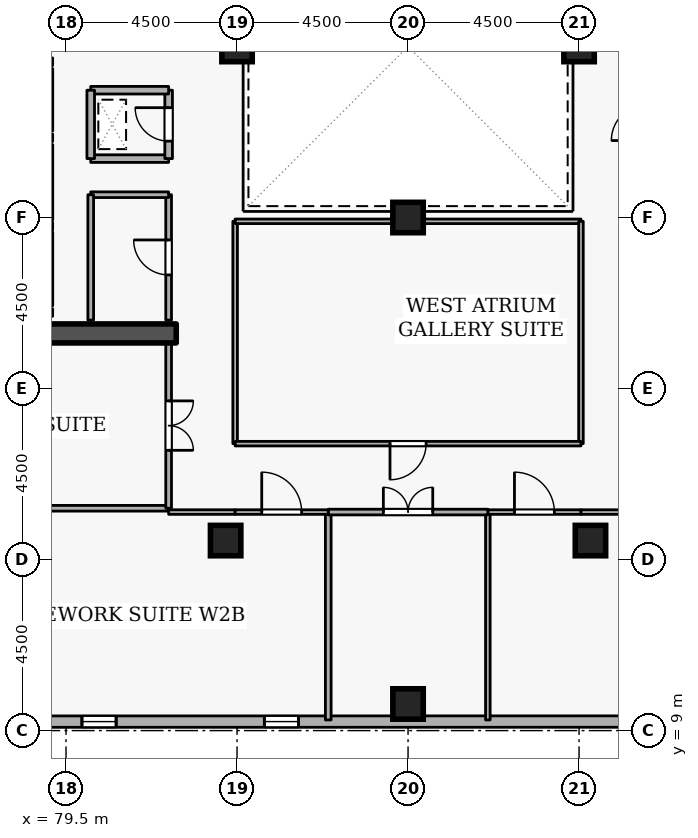
"""IFC4 building model, lengths in metres.
Left out: names, types, materials, properties, quantities, classifications, styles, units other than length and angle.
Written with IfcOpenShell. Run it as: python <this file> out.ifc"""

import sys

from ifc_helpers import new_model, si_unit, direction, frame, frame_2d, origin, origin_2d, place, context, subcontext, project, spatial, rectangle, extrude, element, fill, save


model = new_model("IFC4")
c1 = context("Model", 3, precision=1e-05, world=origin(), true_north=direction((0.0, 1.0)))
c2 = subcontext(c1, "Body", "Model", "MODEL_VIEW")
j1 = project(units=[si_unit("LENGTHUNIT", "METRE"), si_unit("PLANEANGLEUNIT", "RADIAN")], contexts=[c1])
p1 = place(None, origin())
s1 = spatial("IfcSite", under=j1, at=p1, CompositionType="ELEMENT")
p2 = place(p1, origin())
s2 = spatial("IfcBuilding", under=s1, at=p2, CompositionType="ELEMENT")
p3 = place(p2, frame((0.0, 0.0, 261.9)))
s3 = spatial("IfcBuildingStorey", under=s2, at=p3, CompositionType="ELEMENT", Elevation=261.9)
p4 = place(p3, frame((76.6, 19.45, 0.0), z_axis=(0.0, 0.0, 1.0), x_axis=(1.0, 0.0, 0.0)))
e1 = element("IfcWall", 1, at=p4, inside=s3, PredefinedType="SHEAR", context=c2, shape_type="SweptSolid", body=[
    extrude(rectangle(XDim=5.8, YDim=0.5, at=frame_2d((2.9, 0.0))), origin(), (0.0, 0.0, 1.0), 3.6),
])
for number, where, z_axis, x_axis in (
    (2, (88.5, 9.7, 0.0), (0.0, 0.0, 1.0), (1.0, 0.0, 0.0)),
    (3, (93.3, 14.0, 0.0), (0.0, 0.0, 1.0), (1.0, 0.0, 0.0)),
    (4, (83.7, 14.0, 0.0), (0.0, 0.0, 1.0), (1.0, 0.0, 0.0)),
    (5, (93.0, 27.0, 0.0), (0.0, 0.0, 1.0), (1.0, 0.0, 0.0)),
    (6, (84.0, 27.0, 0.0), (0.0, 0.0, 1.0), (1.0, 0.0, 0.0)),
    (7, (88.5, 22.5, 0.0), (0.0, 0.0, 1.0), (1.0, 0.0, 0.0)),
):
    element("IfcColumn", number, at=place(p3, frame(where, z_axis=z_axis, x_axis=x_axis)), inside=s3, PredefinedType="COLUMN", context=c2, shape_type="SweptSolid", body=[
        extrude(rectangle(XDim=0.8, YDim=0.8, at=origin_2d()), origin(), (0.0, 0.0, 1.0), 3.6),
    ])
p5 = place(p3, frame((73.319, 9.235, 0.0), z_axis=(0.0, 0.0, 1.0), x_axis=(0.999999994606, 0.000103863011, 0.0)))
e8 = element("IfcWall", 8, at=p5, inside=s3, PredefinedType="STANDARD", context=c2, shape_type="SweptSolid", body=[
    extrude(rectangle(XDim=35.259, YDim=0.3, at=frame_2d((17.629, 0.0))), origin(), (0.0, 0.0, 1.0), 2.7),
])
p6 = place(p5, frame((6.6, 0.0, 0.72)))
e9 = element("IfcOpeningElement", 9, at=p6, cuts=e8, PredefinedType="OPENING", context=c2, shape_type="SweptSolid", body=[
    extrude(rectangle(XDim=0.9, YDim=1.75, at=frame_2d((0.45, 0.875))), frame((0.0, 0.16, 0.0), z_axis=(0.0, -1.0, 0.0), x_axis=(1.0, 0.0, 0.0)), (0.0, 0.0, 1.0), 0.32),
])
p7 = place(p5, frame((11.4, 0.0, 0.72)))
e10 = element("IfcOpeningElement", 10, at=p7, cuts=e8, PredefinedType="OPENING", context=c2, shape_type="SweptSolid", body=[
    extrude(rectangle(XDim=0.9, YDim=1.75, at=frame_2d((0.45, 0.875))), frame((0.0, 0.16, 0.0), z_axis=(0.0, -1.0, 0.0), x_axis=(1.0, 0.0, 0.0)), (0.0, 0.0, 1.0), 0.32),
])
p8 = place(p5, frame((21.0, 0.0, 0.72)))
e11 = element("IfcOpeningElement", 11, at=p8, cuts=e8, PredefinedType="OPENING", context=c2, shape_type="SweptSolid", body=[
    extrude(rectangle(XDim=0.9, YDim=1.75, at=frame_2d((0.45, 0.875))), frame((0.0, 0.16, 0.0), z_axis=(0.0, -1.0, 0.0), x_axis=(1.0, 0.0, 0.0)), (0.0, 0.0, 1.0), 0.32),
])
p9 = place(p5, frame((25.8, 0.0, 0.72)))
e12 = element("IfcOpeningElement", 12, at=p9, cuts=e8, PredefinedType="OPENING", context=c2, shape_type="SweptSolid", body=[
    extrude(rectangle(XDim=0.9, YDim=1.75, at=frame_2d((0.45, 0.875))), frame((0.0, 0.16, 0.0), z_axis=(0.0, -1.0, 0.0), x_axis=(1.0, 0.0, 0.0)), (0.0, 0.0, 1.0), 0.32),
])
p10 = place(p5, frame((30.6, 0.0, 0.72)))
e13 = element("IfcOpeningElement", 13, at=p10, cuts=e8, PredefinedType="OPENING", context=c2, shape_type="SweptSolid", body=[
    extrude(rectangle(XDim=0.9, YDim=1.75, at=frame_2d((0.45, 0.875))), frame((0.0, 0.16, 0.0), z_axis=(0.0, -1.0, 0.0), x_axis=(1.0, 0.0, 0.0)), (0.0, 0.0, 1.0), 0.32),
])
p11 = place(p3, frame((79.05, 24.78, 0.0), z_axis=(0.0, 0.0, 1.0), x_axis=(0.0, 1.0, 0.0)))
e14 = element("IfcWall", 14, at=p11, inside=s3, PredefinedType="STANDARD", context=c2, shape_type="SweptSolid", body=[
    extrude(rectangle(XDim=1.64, YDim=0.2, at=frame_2d((0.82, 0.0))), origin(), (0.0, 0.0, 1.0), 3.34),
])
p12 = place(p11, frame((0.31, 0.0, 0.0)))
e15 = element("IfcOpeningElement", 15, at=p12, cuts=e14, PredefinedType="OPENING", context=c2, shape_type="SweptSolid", body=[
    extrude(rectangle(XDim=1.02, YDim=2.06, at=frame_2d((0.51, 1.03))), frame((0.0, 0.11, 0.0), z_axis=(0.0, -1.0, 0.0), x_axis=(1.0, 0.0, 0.0)), (0.0, 0.0, 1.0), 0.22),
])
p13 = place(p3, frame((79.05, 22.43, 0.0), z_axis=(0.0, 0.0, 1.0), x_axis=(0.0, 1.0, 0.0)))
e16 = element("IfcWall", 16, at=p13, inside=s3, PredefinedType="STANDARD", context=c2, shape_type="SweptSolid", body=[
    extrude(rectangle(XDim=1.99, YDim=0.2, at=frame_2d((0.995, 0.0))), origin(), (0.0, 0.0, 1.0), 3.34),
])
p14 = place(p13, frame((0.485, 0.0, 0.0)))
e17 = element("IfcOpeningElement", 17, at=p14, cuts=e16, PredefinedType="OPENING", context=c2, shape_type="SweptSolid", body=[
    extrude(rectangle(XDim=1.02, YDim=2.06, at=frame_2d((0.51, 1.03))), frame((0.0, 0.11, 0.0), z_axis=(0.0, -1.0, 0.0), x_axis=(1.0, 0.0, 0.0)), (0.0, 0.0, 1.0), 0.22),
])
p15 = place(p3, frame((79.05, 20.18, 0.0), z_axis=(0.0, 0.0, 1.0), x_axis=(0.0, 1.0, 0.0)))
e18 = element("IfcWall", 18, at=p15, inside=s3, PredefinedType="STANDARD", context=c2, shape_type="SweptSolid", body=[
    extrude(rectangle(XDim=1.94, YDim=0.2, at=frame_2d((0.97, 0.0))), origin(), (0.0, 0.0, 1.0), 3.34),
])
p16 = place(p15, frame((0.46, 0.0, 0.0)))
e19 = element("IfcOpeningElement", 19, at=p16, cuts=e18, PredefinedType="OPENING", context=c2, shape_type="SweptSolid", body=[
    extrude(rectangle(XDim=1.02, YDim=2.06, at=frame_2d((0.51, 1.03))), frame((0.0, 0.11, 0.0), z_axis=(0.0, -1.0, 0.0), x_axis=(1.0, 0.0, 0.0)), (0.0, 0.0, 1.0), 0.22),
])
p17 = place(p3, frame((80.15, 24.05, 0.0), z_axis=(0.0, 0.0, 1.0), x_axis=(1.0, 0.0, 0.0)))
e20 = element("IfcWall", 20, at=p17, inside=s3, PredefinedType="STANDARD", context=c2, shape_type="SweptSolid", body=[
    extrude(rectangle(XDim=2.05, YDim=0.2, at=frame_2d((1.025, 0.0))), origin(), (0.0, 0.0, 1.0), 3.34),
])
p18 = place(p3, frame((82.2, 24.05, 0.0), z_axis=(0.0, 0.0, 1.0), x_axis=(0.0, 1.0, 0.0)))
e21 = element("IfcWall", 21, at=p18, inside=s3, PredefinedType="STANDARD", context=c2, shape_type="SweptSolid", body=[
    extrude(rectangle(XDim=1.8, YDim=0.2, at=frame_2d((0.9, 0.0))), origin(), (0.0, 0.0, 1.0), 3.34),
])
p19 = place(p18, frame((0.46, 0.0, 0.0)))
e22 = element("IfcOpeningElement", 22, at=p19, cuts=e21, PredefinedType="OPENING", context=c2, shape_type="SweptSolid", body=[
    extrude(rectangle(XDim=0.88, YDim=2.04, at=frame_2d((0.44, 1.02))), frame((0.0, 0.11, 0.0), z_axis=(0.0, -1.0, 0.0), x_axis=(1.0, 0.0, 0.0)), (0.0, 0.0, 1.0), 0.22),
])
p20 = place(p3, frame((82.2, 25.85, 0.0), z_axis=(0.0, 0.0, 1.0), x_axis=(-1.0, 0.0, 0.0)))
e23 = element("IfcWall", 23, at=p20, inside=s3, PredefinedType="STANDARD", context=c2, shape_type="SweptSolid", body=[
    extrude(rectangle(XDim=2.05, YDim=0.2, at=frame_2d((1.025, 0.0))), origin(), (0.0, 0.0, 1.0), 3.34),
])
p21 = place(p3, frame((80.15, 25.85, 0.0), z_axis=(0.0, 0.0, 1.0), x_axis=(0.0, -1.0, 0.0)))
e24 = element("IfcWall", 24, at=p21, inside=s3, PredefinedType="STANDARD", context=c2, shape_type="SweptSolid", body=[
    extrude(rectangle(XDim=1.8, YDim=0.2, at=frame_2d((0.9, 0.0))), origin(), (0.0, 0.0, 1.0), 3.34),
])
p22 = place(p3, frame((82.2, 19.8, 0.0), z_axis=(0.0, 0.0, 1.0), x_axis=(0.0, 1.0, 0.0)))
e25 = element("IfcWall", 25, at=p22, inside=s3, PredefinedType="PARTITIONING", context=c2, shape_type="SweptSolid", body=[
    extrude(rectangle(XDim=3.3, YDim=0.15, at=frame_2d((1.65, 0.0))), origin(), (0.0, 0.0, 1.0), 3.34),
])
p23 = place(p22, frame((1.19, 0.0, 0.0)))
e26 = element("IfcOpeningElement", 26, at=p23, cuts=e25, PredefinedType="OPENING", context=c2, shape_type="SweptSolid", body=[
    extrude(rectangle(XDim=0.92, YDim=2.08, at=frame_2d((0.46, 1.04))), frame((0.0, 0.085, 0.0), z_axis=(0.0, -1.0, 0.0), x_axis=(1.0, 0.0, 0.0)), (0.0, 0.0, 1.0), 0.17),
])
p24 = place(p3, frame((82.2, 23.1, 0.0), z_axis=(0.0, 0.0, 1.0), x_axis=(-1.0, 0.0, 0.0)))
e27 = element("IfcWall", 27, at=p24, inside=s3, PredefinedType="PARTITIONING", context=c2, shape_type="SweptSolid", body=[
    extrude(rectangle(XDim=2.05, YDim=0.15, at=frame_2d((1.025, 0.0))), origin(), (0.0, 0.0, 1.0), 3.34),
])
p25 = place(p3, frame((80.15, 23.1, 0.0), z_axis=(0.0, 0.0, 1.0), x_axis=(0.0, -1.0, 0.0)))
e28 = element("IfcWall", 28, at=p25, inside=s3, PredefinedType="PARTITIONING", context=c2, shape_type="SweptSolid", body=[
    extrude(rectangle(XDim=3.3, YDim=0.15, at=frame_2d((1.65, 0.0))), origin(), (0.0, 0.0, 1.0), 3.34),
])
p26 = place(p3, frame((82.2, 14.85, 0.0), z_axis=(0.0, 0.0, 1.0), x_axis=(-1.0, 0.0, 0.0)))
e29 = element("IfcWall", 29, at=p26, inside=s3, PredefinedType="PARTITIONING", context=c2, shape_type="SweptSolid", body=[
    extrude(rectangle(XDim=11.42, YDim=0.15, at=frame_2d((5.71, 0.0))), origin(), (0.0, 0.0, 1.0), 3.34),
])
p27 = place(p3, frame((82.2, 19.2, 0.0), z_axis=(0.0, 0.0, 1.0), x_axis=(0.0, -1.0, 0.0)))
e30 = element("IfcWall", 30, at=p27, inside=s3, PredefinedType="PARTITIONING", context=c2, shape_type="SweptSolid", body=[
    extrude(rectangle(XDim=4.35, YDim=0.15, at=frame_2d((2.175, 0.0))), origin(), (0.0, 0.0, 1.0), 3.34),
])
p28 = place(p27, frame((1.525, 0.0, 0.0)))
e31 = element("IfcOpeningElement", 31, at=p28, cuts=e30, PredefinedType="OPENING", context=c2, shape_type="SweptSolid", body=[
    extrude(rectangle(XDim=1.3, YDim=2.12, at=frame_2d((0.65, 1.06))), frame((0.0, 0.085, 0.0), z_axis=(0.0, -1.0, 0.0), x_axis=(1.0, 0.0, 0.0)), (0.0, 0.0, 1.0), 0.17),
])
p29 = place(p3, frame((90.6, 9.28, 0.0), z_axis=(0.0, 0.0, 1.0), x_axis=(0.0, 1.0, 0.0)))
e32 = element("IfcWall", 32, at=p29, inside=s3, PredefinedType="PARTITIONING", context=c2, shape_type="SweptSolid", body=[
    extrude(rectangle(XDim=5.47, YDim=0.12, at=frame_2d((2.735, 0.0))), origin(), (0.0, 0.0, 1.0), 3.34),
])
p30 = place(p3, frame((90.6, 14.75, 0.0), z_axis=(0.0, 0.0, 1.0), x_axis=(1.0, 0.0, 0.0)))
e33 = element("IfcWall", 33, at=p30, inside=s3, PredefinedType="PARTITIONING", context=c2, shape_type="SweptSolid", body=[
    extrude(rectangle(XDim=2.45, YDim=0.12, at=frame_2d((1.225, 0.0))), origin(), (0.0, 0.0, 1.0), 3.34),
])
p31 = place(p30, frame((0.7, 0.0, 0.0)))
e34 = element("IfcOpeningElement", 34, at=p31, cuts=e33, PredefinedType="OPENING", context=c2, shape_type="SweptSolid", body=[
    extrude(rectangle(XDim=1.05, YDim=2.1, at=frame_2d((0.525, 1.05))), frame((0.0, 0.07, 0.0), z_axis=(0.0, -1.0, 0.0), x_axis=(1.0, 0.0, 0.0)), (0.0, 0.0, 1.0), 0.14),
])
p32 = place(p3, frame((93.05, 14.75, 0.0), z_axis=(0.0, 0.0, 1.0), x_axis=(1.0, 0.0, 0.0)))
e35 = element("IfcWall", 35, at=p32, inside=s3, PredefinedType="PARTITIONING", context=c2, shape_type="SweptSolid", body=[
    extrude(rectangle(XDim=1.75, YDim=0.12, at=frame_2d((0.875, 0.0))), origin(), (0.0, 0.0, 1.0), 3.34),
])
p33 = place(p3, frame((86.4, 9.28, 0.0), z_axis=(0.0, 0.0, 1.0), x_axis=(0.0, 1.0, 0.0)))
e36 = element("IfcWall", 36, at=p33, inside=s3, PredefinedType="PARTITIONING", context=c2, shape_type="SweptSolid", body=[
    extrude(rectangle(XDim=5.47, YDim=0.15, at=frame_2d((2.735, 0.0))), origin(), (0.0, 0.0, 1.0), 3.34),
])
p34 = place(p3, frame((86.4, 14.75, 0.0), z_axis=(0.0, 0.0, 1.0), x_axis=(1.0, 0.0, 0.0)))
e37 = element("IfcWall", 37, at=p34, inside=s3, PredefinedType="PARTITIONING", context=c2, shape_type="SweptSolid", body=[
    extrude(rectangle(XDim=4.2, YDim=0.15, at=frame_2d((2.1, 0.0))), origin(), (0.0, 0.0, 1.0), 3.34),
])
p35 = place(p34, frame((1.45, 0.0, 0.0)))
e38 = element("IfcOpeningElement", 38, at=p35, cuts=e37, PredefinedType="OPENING", context=c2, shape_type="SweptSolid", body=[
    extrude(rectangle(XDim=1.3, YDim=2.12, at=frame_2d((0.65, 1.06))), frame((0.0, 0.085, 0.0), z_axis=(0.0, -1.0, 0.0), x_axis=(1.0, 0.0, 0.0)), (0.0, 0.0, 1.0), 0.17),
])
p36 = place(p3, frame((82.2, 14.75, 0.0), z_axis=(0.0, 0.0, 1.0), x_axis=(1.0, 0.0, 0.0)))
e39 = element("IfcWall", 39, at=p36, inside=s3, PredefinedType="PARTITIONING", context=c2, shape_type="SweptSolid", body=[
    extrude(rectangle(XDim=1.75, YDim=0.12, at=frame_2d((0.875, 0.0))), origin(), (0.0, 0.0, 1.0), 3.34),
])
p37 = place(p3, frame((83.95, 14.75, 0.0), z_axis=(0.0, 0.0, 1.0), x_axis=(1.0, 0.0, 0.0)))
e40 = element("IfcWall", 40, at=p37, inside=s3, PredefinedType="PARTITIONING", context=c2, shape_type="SweptSolid", body=[
    extrude(rectangle(XDim=2.45, YDim=0.12, at=frame_2d((1.225, 0.0))), origin(), (0.0, 0.0, 1.0), 3.34),
])
p38 = place(p37, frame((0.7, 0.0, 0.0)))
e41 = element("IfcOpeningElement", 41, at=p38, cuts=e40, PredefinedType="OPENING", context=c2, shape_type="SweptSolid", body=[
    extrude(rectangle(XDim=1.05, YDim=2.1, at=frame_2d((0.525, 1.05))), frame((0.0, 0.07, 0.0), z_axis=(0.0, -1.0, 0.0), x_axis=(1.0, 0.0, 0.0)), (0.0, 0.0, 1.0), 0.14),
])
p39 = place(p3, frame((83.95, 16.55, 0.0), z_axis=(0.0, 0.0, 1.0), x_axis=(0.0, 1.0, 0.0)))
e42 = element("IfcWall", 42, at=p39, inside=s3, PredefinedType="PARTITIONING", context=c2, shape_type="SweptSolid", body=[
    extrude(rectangle(XDim=5.85, YDim=0.12, at=frame_2d((2.925, 0.0))), origin(), (0.0, 0.0, 1.0), 3.34),
])
p40 = place(p3, frame((83.95, 22.4, 0.0), z_axis=(0.0, 0.0, 1.0), x_axis=(1.0, 0.0, 0.0)))
e43 = element("IfcWall", 43, at=p40, inside=s3, PredefinedType="PARTITIONING", context=c2, shape_type="SweptSolid", body=[
    extrude(rectangle(XDim=9.1, YDim=0.12, at=frame_2d((4.55, 0.0))), origin(), (0.0, 0.0, 1.0), 3.34),
])
p41 = place(p3, frame((93.05, 22.4, 0.0), z_axis=(0.0, 0.0, 1.0), x_axis=(0.0, -1.0, 0.0)))
e44 = element("IfcWall", 44, at=p41, inside=s3, PredefinedType="PARTITIONING", context=c2, shape_type="SweptSolid", body=[
    extrude(rectangle(XDim=5.85, YDim=0.12, at=frame_2d((2.925, 0.0))), origin(), (0.0, 0.0, 1.0), 3.34),
])
p42 = place(p3, frame((93.05, 16.55, 0.0), z_axis=(0.0, 0.0, 1.0), x_axis=(-1.0, 0.0, 0.0)))
e45 = element("IfcWall", 45, at=p42, inside=s3, PredefinedType="PARTITIONING", context=c2, shape_type="SweptSolid", body=[
    extrude(rectangle(XDim=9.1, YDim=0.12, at=frame_2d((4.55, 0.0))), origin(), (0.0, 0.0, 1.0), 3.34),
])
p43 = place(p42, frame((4.075, 0.0, 0.0)))
e46 = element("IfcOpeningElement", 46, at=p43, cuts=e45, PredefinedType="OPENING", context=c2, shape_type="SweptSolid", body=[
    extrude(rectangle(XDim=0.95, YDim=2.1, at=frame_2d((0.475, 1.05))), frame((0.0, 0.07, 0.0), z_axis=(0.0, -1.0, 0.0), x_axis=(1.0, 0.0, 0.0)), (0.0, 0.0, 1.0), 0.14),
])
p44 = place(p6, origin())
e47 = element("IfcWindow", 47, at=p44, inside=s3, PartitioningType="SINGLE_PANEL", PredefinedType="WINDOW", context=c2, shape_type="SweptSolid", body=[
    extrude(rectangle(XDim=0.9, YDim=1.75, at=frame_2d((0.45, 0.875))), frame((0.0, 0.03, 0.0), z_axis=(0.0, -1.0, 0.0), x_axis=(1.0, 0.0, 0.0)), (0.0, 0.0, 1.0), 0.06),
])
fill(e9, e47)
p45 = place(p7, origin())
e48 = element("IfcWindow", 48, at=p45, inside=s3, PartitioningType="SINGLE_PANEL", PredefinedType="WINDOW", context=c2, shape_type="SweptSolid", body=[
    extrude(rectangle(XDim=0.9, YDim=1.75, at=frame_2d((0.45, 0.875))), frame((0.0, 0.03, 0.0), z_axis=(0.0, -1.0, 0.0), x_axis=(1.0, 0.0, 0.0)), (0.0, 0.0, 1.0), 0.06),
])
fill(e10, e48)
p46 = place(p19, origin())
e49 = element("IfcDoor", 49, at=p46, inside=s3, OperationType="SINGLE_SWING_RIGHT", PredefinedType="DOOR", context=c2, shape_type="SweptSolid", body=[
    extrude(rectangle(XDim=0.88, YDim=2.04, at=frame_2d((0.44, 1.02))), frame((0.0, 0.025, 0.0), z_axis=(0.0, -1.0, 0.0), x_axis=(1.0, 0.0, 0.0)), (0.0, 0.0, 1.0), 0.05),
])
fill(e22, e49)
p47 = place(p23, origin())
e50 = element("IfcDoor", 50, at=p47, inside=s3, OperationType="SINGLE_SWING_RIGHT", PredefinedType="DOOR", context=c2, shape_type="SweptSolid", body=[
    extrude(rectangle(XDim=0.92, YDim=2.08, at=frame_2d((0.46, 1.04))), frame((0.0, 0.025, 0.0), z_axis=(0.0, -1.0, 0.0), x_axis=(1.0, 0.0, 0.0)), (0.0, 0.0, 1.0), 0.05),
])
fill(e26, e50)
p48 = place(p28, origin())
e51 = element("IfcDoor", 51, at=p48, inside=s3, OperationType="DOUBLE_DOOR_SINGLE_SWING", PredefinedType="DOOR", context=c2, shape_type="SweptSolid", body=[
    extrude(rectangle(XDim=1.3, YDim=2.12, at=frame_2d((0.65, 1.06))), frame((0.0, 0.025, 0.0), z_axis=(0.0, -1.0, 0.0), x_axis=(1.0, 0.0, 0.0)), (0.0, 0.0, 1.0), 0.05),
])
fill(e31, e51)
p49 = place(p31, origin())
e52 = element("IfcDoor", 52, at=p49, inside=s3, OperationType="SINGLE_SWING_LEFT", PredefinedType="DOOR", context=c2, shape_type="SweptSolid", body=[
    extrude(rectangle(XDim=1.05, YDim=2.1, at=frame_2d((0.525, 1.05))), frame((0.0, 0.025, 0.0), z_axis=(0.0, -1.0, 0.0), x_axis=(1.0, 0.0, 0.0)), (0.0, 0.0, 1.0), 0.05),
])
fill(e34, e52)
p50 = place(p35, origin())
e53 = element("IfcDoor", 53, at=p50, inside=s3, OperationType="DOUBLE_DOOR_SINGLE_SWING", PredefinedType="DOOR", context=c2, shape_type="SweptSolid", body=[
    extrude(rectangle(XDim=1.3, YDim=2.12, at=frame_2d((0.65, 1.06))), frame((0.0, 0.025, 0.0), z_axis=(0.0, -1.0, 0.0), x_axis=(1.0, 0.0, 0.0)), (0.0, 0.0, 1.0), 0.05),
])
fill(e38, e53)
p51 = place(p38, origin())
e54 = element("IfcDoor", 54, at=p51, inside=s3, OperationType="SINGLE_SWING_LEFT", PredefinedType="DOOR", context=c2, shape_type="SweptSolid", body=[
    extrude(rectangle(XDim=1.05, YDim=2.1, at=frame_2d((0.525, 1.05))), frame((0.0, 0.025, 0.0), z_axis=(0.0, -1.0, 0.0), x_axis=(1.0, 0.0, 0.0)), (0.0, 0.0, 1.0), 0.05),
])
fill(e41, e54)
p52 = place(p43, origin())
e55 = element("IfcDoor", 55, at=p52, inside=s3, OperationType="SINGLE_SWING_RIGHT", PredefinedType="DOOR", context=c2, shape_type="SweptSolid", body=[
    extrude(rectangle(XDim=0.95, YDim=2.1, at=frame_2d((0.475, 1.05))), frame((0.0, 0.025, 0.0), z_axis=(0.0, -1.0, 0.0), x_axis=(1.0, 0.0, 0.0)), (0.0, 0.0, 1.0), 0.05),
])
fill(e46, e55)
save(model, sys.argv[1])
